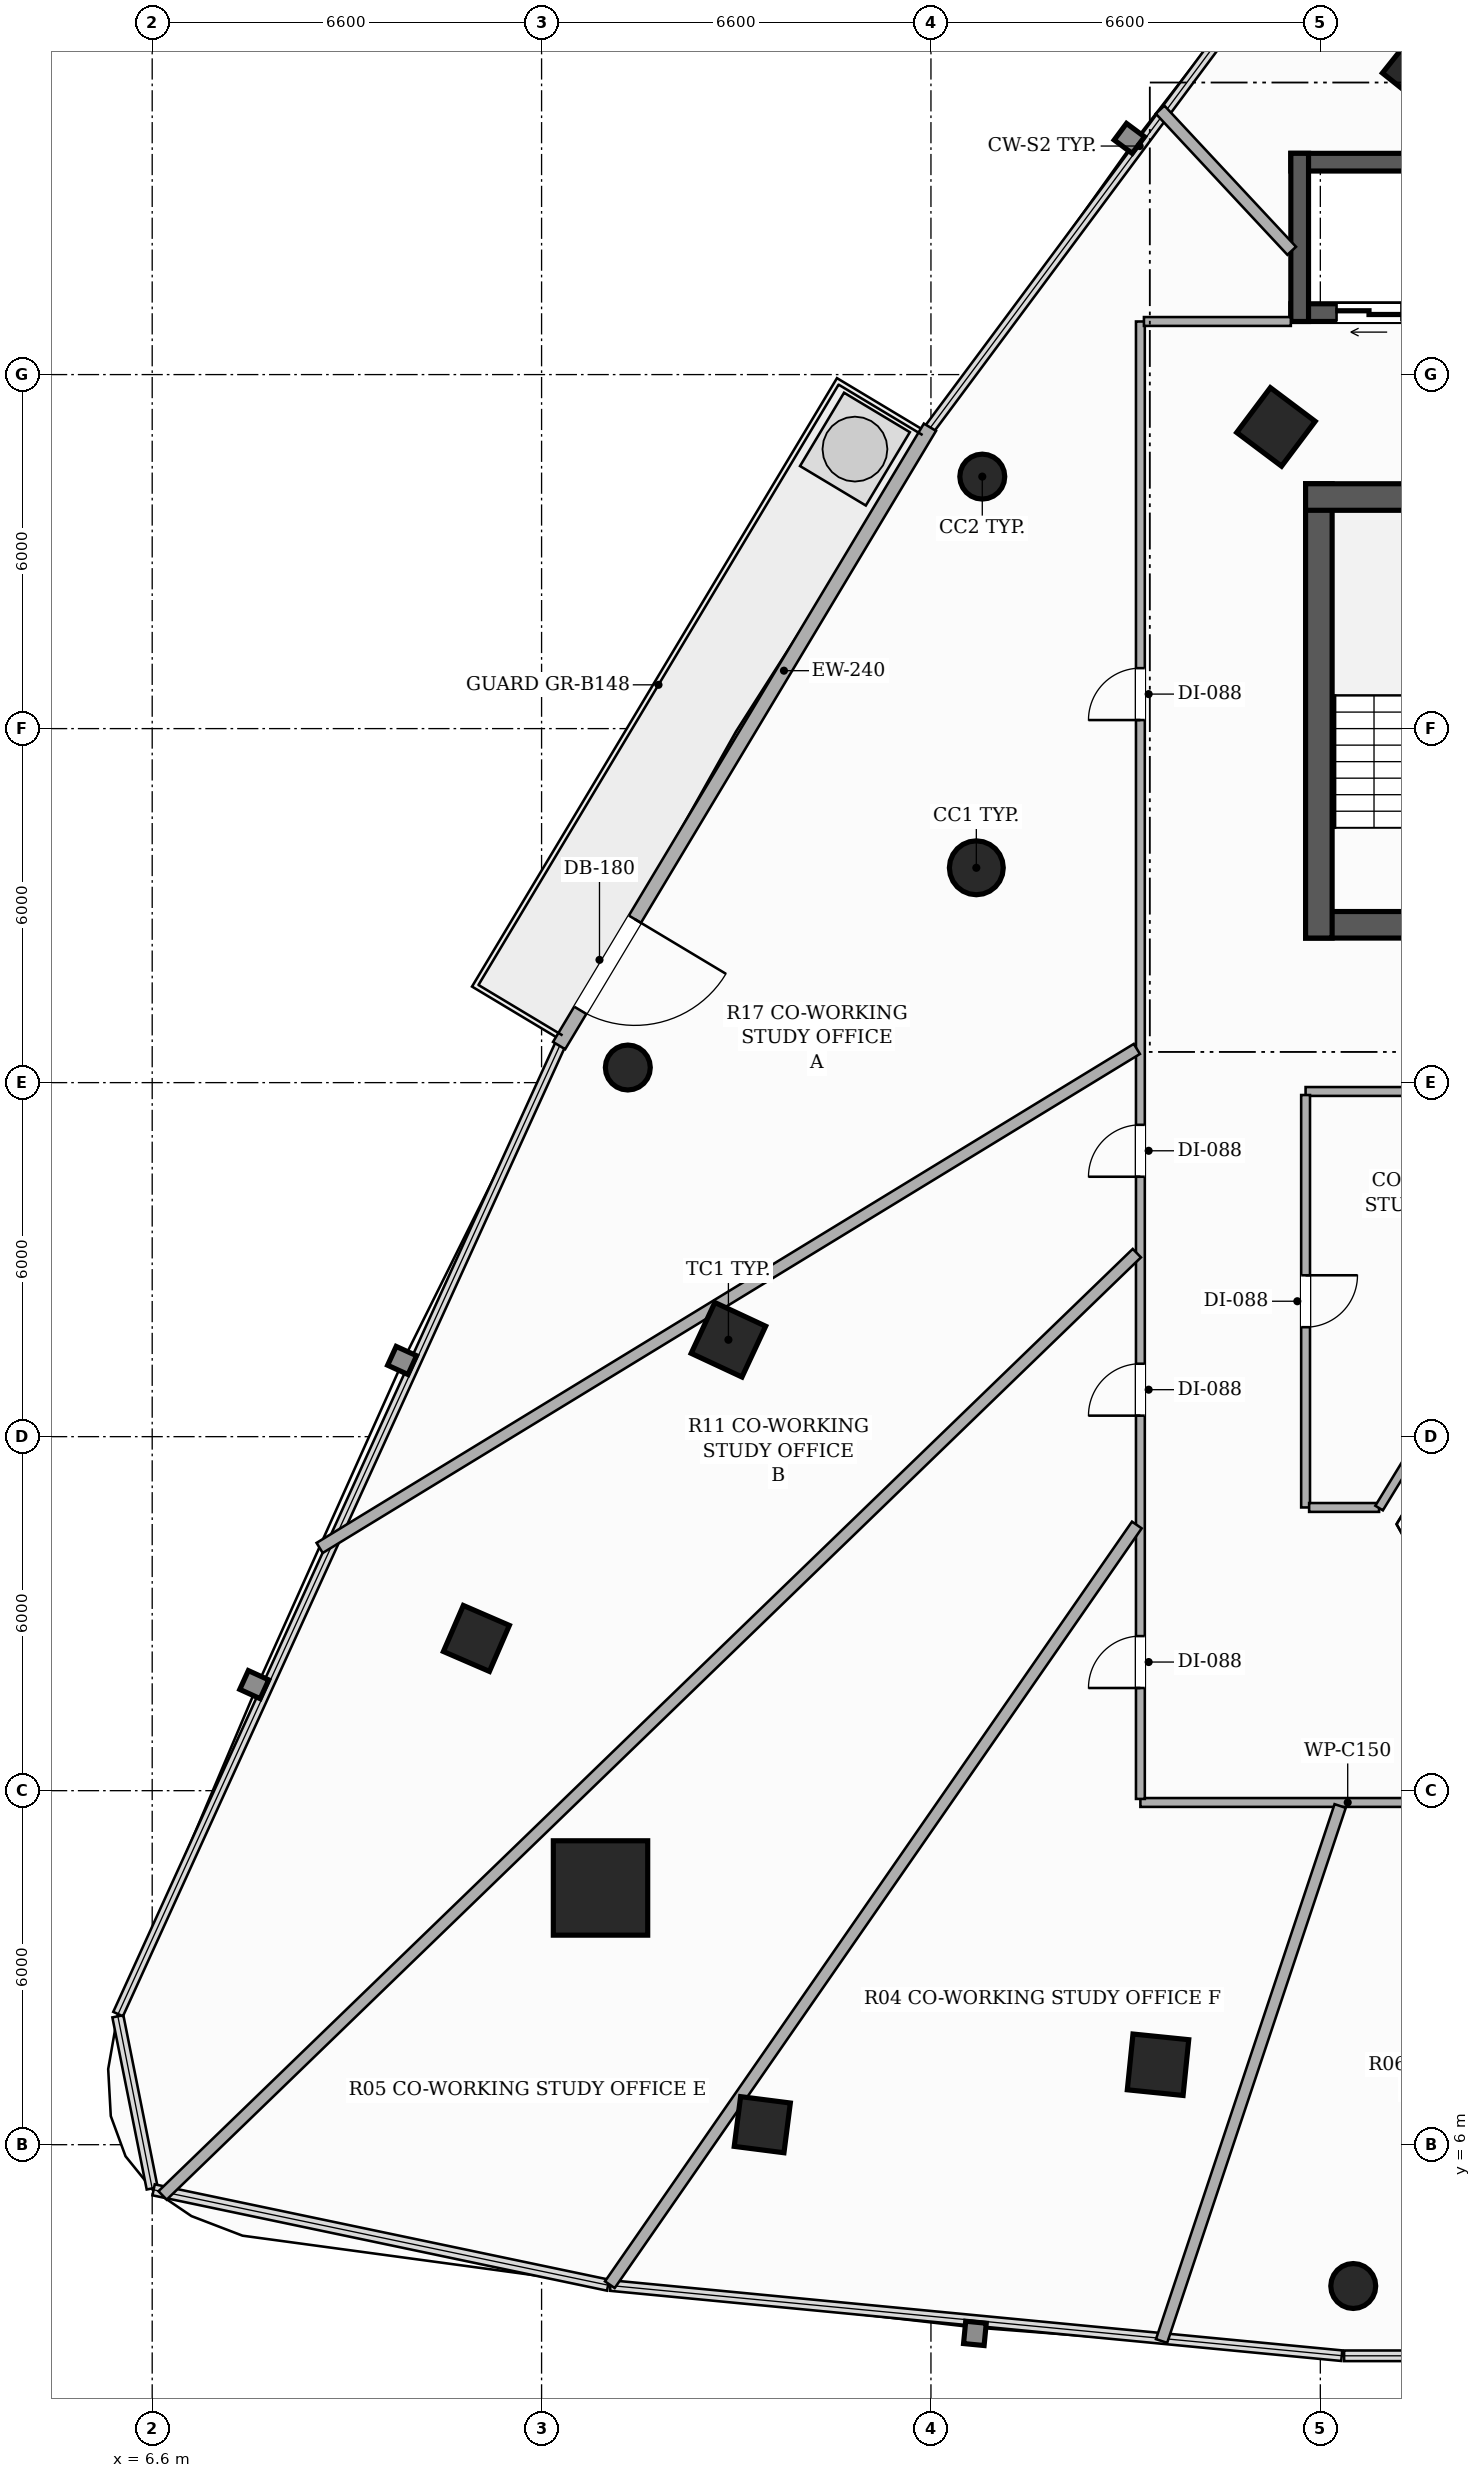
"""IFC4 building model, lengths in metres.
Left out: names, types, materials, properties, quantities, classifications, styles, units other than length and angle.
Written with IfcOpenShell. Run it as: python <this file> out.ifc"""

import sys

from ifc_helpers import new_model, si_unit, direction, frame, frame_2d, origin, origin_2d, place, context, subcontext, project, spatial, rectangle, hollow_rectangle, hollow_circle, extrude, element, fill, save


model = new_model("IFC4")
c1 = context("Model", 3, precision=1e-05, world=origin(), true_north=direction((0.0, 1.0)))
c2 = subcontext(c1, "Body", "Model", "MODEL_VIEW")
j1 = project(units=[si_unit("LENGTHUNIT", "METRE"), si_unit("PLANEANGLEUNIT", "RADIAN")], contexts=[c1])
p1 = place(None, origin())
s1 = spatial("IfcSite", under=j1, at=p1, CompositionType="ELEMENT")
p2 = place(p1, origin())
s2 = spatial("IfcBuilding", under=s1, at=p2, CompositionType="ELEMENT")
p3 = place(p2, frame((0.0, 0.0, 93.95)))
s3 = spatial("IfcBuildingStorey", under=s2, at=p3, CompositionType="ELEMENT", Elevation=93.95)
p4 = place(p3, frame((26.15, 26.675, 0.0), z_axis=(0.0, 0.0, 1.0), x_axis=(1.0, 0.0, 0.0)))
e1 = element("IfcWall", 1, at=p4, inside=s3, PredefinedType="SHEAR", context=c2, shape_type="SweptSolid", body=[
    extrude(rectangle(XDim=13.7, YDim=0.45, at=frame_2d((6.85, 0.0))), origin(), (0.0, 0.0, 1.0), 3.3),
])
p5 = place(p4, frame((4.35, 0.0, 0.0)))
e2 = element("IfcOpeningElement", 2, at=p5, cuts=e1, PredefinedType="OPENING", context=c2, shape_type="SweptSolid", body=[
    extrude(rectangle(XDim=1.05, YDim=2.15, at=frame_2d((0.525, 1.075))), frame((0.0, 0.235, 0.0), z_axis=(0.0, -1.0, 0.0), x_axis=(1.0, 0.0, 0.0)), (0.0, 0.0, 1.0), 0.47),
])
p6 = place(p4, frame((8.3, 0.0, 0.0)))
e3 = element("IfcOpeningElement", 3, at=p6, cuts=e1, PredefinedType="OPENING", context=c2, shape_type="SweptSolid", body=[
    extrude(rectangle(XDim=1.05, YDim=2.15, at=frame_2d((0.525, 1.075))), frame((0.0, 0.235, 0.0), z_axis=(0.0, -1.0, 0.0), x_axis=(1.0, 0.0, 0.0)), (0.0, 0.0, 1.0), 0.47),
])
p7 = place(p3, frame((26.375, 26.45, 0.0), z_axis=(0.0, 0.0, 1.0), x_axis=(0.0, 1.0, 0.0)))
e4 = element("IfcWall", 4, at=p7, inside=s3, PredefinedType="SHEAR", context=c2, shape_type="SweptSolid", body=[
    extrude(rectangle(XDim=7.7, YDim=0.45, at=frame_2d((3.85, 0.0))), origin(), (0.0, 0.0, 1.0), 3.3),
])
p8 = place(p3, frame((26.15, 33.925, 0.0), z_axis=(0.0, 0.0, 1.0), x_axis=(1.0, 0.0, 0.0)))
e5 = element("IfcWall", 5, at=p8, inside=s3, PredefinedType="SHEAR", context=c2, shape_type="SweptSolid", body=[
    extrude(rectangle(XDim=3.75, YDim=0.45, at=frame_2d((1.875, 0.0))), origin(), (0.0, 0.0, 1.0), 3.3),
])
p9 = place(p3, frame((40.1, 37.05, 0.0), z_axis=(0.0, 0.0, 1.0), x_axis=(-1.0, 0.0, 0.0)))
e6 = element("IfcWall", 6, at=p9, inside=s3, PredefinedType="SHEAR", context=c2, shape_type="SweptSolid", body=[
    extrude(rectangle(XDim=14.2, YDim=0.3, at=frame_2d((7.1, 0.0))), origin(), (0.0, 0.0, 1.0), 3.3),
])
p10 = place(p9, frame((12.325, 0.0, 0.0)))
e7 = element("IfcOpeningElement", 7, at=p10, cuts=e6, PredefinedType="OPENING", context=c2, shape_type="SweptSolid", body=[
    extrude(rectangle(XDim=1.1, YDim=2.2, at=frame_2d((0.55, 1.1))), frame((0.0, 0.16, 0.0), z_axis=(0.0, -1.0, 0.0), x_axis=(1.0, 0.0, 0.0)), (0.0, 0.0, 1.0), 0.32),
])
p11 = place(p9, frame((0.775, 0.0, 0.0)))
e8 = element("IfcOpeningElement", 8, at=p11, cuts=e6, PredefinedType="OPENING", context=c2, shape_type="SweptSolid", body=[
    extrude(rectangle(XDim=1.1, YDim=2.2, at=frame_2d((0.55, 1.1))), frame((0.0, 0.16, 0.0), z_axis=(0.0, -1.0, 0.0), x_axis=(1.0, 0.0, 0.0)), (0.0, 0.0, 1.0), 0.32),
])
p12 = place(p3, frame((25.9, 39.6, 0.0), z_axis=(0.0, 0.0, 1.0), x_axis=(1.0, 0.0, 0.0)))
e9 = element("IfcWall", 9, at=p12, inside=s3, PredefinedType="SHEAR", context=c2, shape_type="SweptSolid", body=[
    extrude(rectangle(XDim=14.2, YDim=0.3, at=frame_2d((7.1, 0.0))), origin(), (0.0, 0.0, 1.0), 3.3),
])
p13 = place(p3, frame((26.05, 36.9, 0.0), z_axis=(0.0, 0.0, 1.0), x_axis=(0.0, 1.0, 0.0)))
e10 = element("IfcWall", 10, at=p13, inside=s3, PredefinedType="SHEAR", context=c2, shape_type="SweptSolid", body=[
    extrude(rectangle(XDim=2.85, YDim=0.3, at=frame_2d((1.425, 0.0))), origin(), (0.0, 0.0, 1.0), 3.3),
])
p14 = place(p3, frame((14.199, 10.351, 0.0), z_axis=(0.0, 0.0, 1.0), x_axis=(1.0, 0.0, 0.0)))
e11 = element("IfcColumn", 11, at=p14, inside=s3, PredefinedType="COLUMN", context=c2, shape_type="SweptSolid", body=[
    extrude(hollow_rectangle(XDim=1.6, YDim=1.6, WallThickness=0.05, at=origin_2d()), origin(), (0.0, 0.0, 1.0), 3.3),
])
p15 = place(p3, frame((25.648, 35.113, 0.0), z_axis=(0.0, 0.0, 1.0), x_axis=(0.600420225326, 0.799684658487, 0.0)))
e12 = element("IfcColumn", 12, at=p15, inside=s3, PredefinedType="COLUMN", context=c2, shape_type="SweptSolid", body=[
    extrude(hollow_rectangle(XDim=0.95, YDim=0.95, WallThickness=0.032, at=origin_2d()), origin(), (0.0, 0.0, 1.0), 3.3),
])
p16 = place(p3, frame((20.569, 27.641, 0.0), z_axis=(0.0, 0.0, 1.0), x_axis=(1.0, 0.0, 0.0)))
e13 = element("IfcColumn", 13, at=p16, inside=s3, PredefinedType="COLUMN", context=c2, shape_type="SweptSolid", body=[
    extrude(hollow_circle(Radius=0.457, WallThickness=0.025, at=origin_2d()), origin(), (0.0, 0.0, 1.0), 3.3),
])
for number, where, z_axis, x_axis in (
    (14, (16.367, 19.642, 0.0), (0.0, 0.0, 1.0), (0.423, 0.906, 0.0)),
    (15, (23.649, 7.355, 0.0), (0.0, 0.0, 1.0), (-0.995, 0.101, 0.0)),
):
    element("IfcColumn", number, at=place(p3, frame(where, z_axis=z_axis, x_axis=x_axis)), inside=s3, PredefinedType="COLUMN", context=c2, shape_type="SweptSolid", body=[
        extrude(hollow_rectangle(XDim=0.95, YDim=0.95, WallThickness=0.032, at=origin_2d()), origin(), (0.0, 0.0, 1.0), 3.3),
    ])
for number, where, z_axis, x_axis in (
    (16, (28.05, 41.178, 0.0), (0.0, 0.0, 1.0), (0.624, 0.782, 0.0)),
    (17, (12.095, 14.58, 0.0), (0.0, 0.0, 1.0), (0.397, 0.918, 0.0)),
    (18, (16.941, 6.339, 0.0), (0.0, 0.0, 1.0), (-0.992, 0.127, 0.0)),
):
    element("IfcColumn", number, at=place(p3, frame(where, z_axis=z_axis, x_axis=x_axis)), inside=s3, PredefinedType="COLUMN", context=c2, shape_type="SweptSolid", body=[
        extrude(hollow_rectangle(XDim=0.85, YDim=0.85, WallThickness=0.028, at=origin_2d()), origin(), (0.0, 0.0, 1.0), 3.3),
    ])
for number, where, z_axis, x_axis in (
    (19, (20.67, 34.271, 0.0), (0.0, 0.0, 1.0), (1.0, 0.0, 0.0)),
    (20, (14.662, 24.256, 0.0), (0.0, 0.0, 1.0), (1.0, 0.0, 0.0)),
    (21, (26.958, 3.605, 0.0), (0.0, 0.0, 1.0), (1.0, 0.0, 0.0)),
):
    element("IfcColumn", number, at=place(p3, frame(where, z_axis=z_axis, x_axis=x_axis)), inside=s3, PredefinedType="COLUMN", context=c2, shape_type="SweptSolid", body=[
        extrude(hollow_circle(Radius=0.381, WallThickness=0.022, at=origin_2d()), origin(), (0.0, 0.0, 1.0), 3.3),
    ])
p17 = place(p3, frame((19.783, 35.108, 0.0), z_axis=(0.0, 0.0, 1.0), x_axis=(-0.514369419392, -0.857568714678, 0.0)))
e22 = element("IfcWall", 22, at=p17, inside=s3, PredefinedType="SOLIDWALL", context=c2, shape_type="SweptSolid", body=[
    extrude(rectangle(XDim=12.22, YDim=0.24, at=frame_2d((6.11, 0.0))), origin(), (0.0, 0.0, 1.0), 2.584),
])
p18 = place(p17, frame((9.723, 0.0, 0.0)))
e23 = element("IfcOpeningElement", 23, at=p18, cuts=e22, PredefinedType="OPENING", context=c2, shape_type="SweptSolid", body=[
    extrude(rectangle(XDim=1.8, YDim=2.2, at=frame_2d((0.9, 1.1))), frame((0.0, 0.13, 0.0), z_axis=(0.0, -1.0, 0.0), x_axis=(1.0, 0.0, 0.0)), (0.0, 0.0, 1.0), 0.26),
])
p19 = place(p3, frame((42.59, 11.8, 0.0), z_axis=(0.0, 0.0, 1.0), x_axis=(-1.0, 0.0, 0.0)))
e24 = element("IfcWall", 24, at=p19, inside=s3, PredefinedType="PARTITIONING", context=c2, shape_type="SweptSolid", body=[
    extrude(rectangle(XDim=19.24, YDim=0.15, at=frame_2d((9.62, 0.0))), origin(), (0.0, 0.0, 1.0), 2.629),
])
p20 = place(p19, frame((11.192, 0.0, 0.0)))
e25 = element("IfcOpeningElement", 25, at=p20, cuts=e24, PredefinedType="OPENING", context=c2, shape_type="SweptSolid", body=[
    extrude(rectangle(XDim=0.92, YDim=2.15, at=frame_2d((0.46, 1.075))), frame((0.0, 0.085, 0.0), z_axis=(0.0, -1.0, 0.0), x_axis=(1.0, 0.0, 0.0)), (0.0, 0.0, 1.0), 0.17),
])
p21 = place(p19, frame((3.42, 0.0, 0.0)))
e26 = element("IfcOpeningElement", 26, at=p21, cuts=e24, PredefinedType="OPENING", context=c2, shape_type="SweptSolid", body=[
    extrude(rectangle(XDim=0.92, YDim=2.15, at=frame_2d((0.46, 1.075))), frame((0.0, 0.085, 0.0), z_axis=(0.0, -1.0, 0.0), x_axis=(1.0, 0.0, 0.0)), (0.0, 0.0, 1.0), 0.17),
])
p22 = place(p3, frame((23.35, 11.86, 0.0), z_axis=(0.0, 0.0, 1.0), x_axis=(0.0, 1.0, 0.0)))
e27 = element("IfcWall", 27, at=p22, inside=s3, PredefinedType="PARTITIONING", context=c2, shape_type="SweptSolid", body=[
    extrude(rectangle(XDim=25.04, YDim=0.15, at=frame_2d((12.52, 0.0))), origin(), (0.0, 0.0, 1.0), 2.373),
])
p23 = place(p22, frame((18.285, 0.0, 0.0)))
e28 = element("IfcOpeningElement", 28, at=p23, cuts=e27, PredefinedType="OPENING", context=c2, shape_type="SweptSolid", body=[
    extrude(rectangle(XDim=0.88, YDim=2.1, at=frame_2d((0.44, 1.05))), frame((0.0, 0.085, 0.0), z_axis=(0.0, -1.0, 0.0), x_axis=(1.0, 0.0, 0.0)), (0.0, 0.0, 1.0), 0.17),
])
p24 = place(p22, frame((10.545, 0.0, 0.0)))
e29 = element("IfcOpeningElement", 29, at=p24, cuts=e27, PredefinedType="OPENING", context=c2, shape_type="SweptSolid", body=[
    extrude(rectangle(XDim=0.88, YDim=2.1, at=frame_2d((0.44, 1.05))), frame((0.0, 0.085, 0.0), z_axis=(0.0, -1.0, 0.0), x_axis=(1.0, 0.0, 0.0)), (0.0, 0.0, 1.0), 0.17),
])
p25 = place(p22, frame((6.496, 0.0, 0.0)))
e30 = element("IfcOpeningElement", 30, at=p25, cuts=e27, PredefinedType="OPENING", context=c2, shape_type="SweptSolid", body=[
    extrude(rectangle(XDim=0.88, YDim=2.1, at=frame_2d((0.44, 1.05))), frame((0.0, 0.085, 0.0), z_axis=(0.0, -1.0, 0.0), x_axis=(1.0, 0.0, 0.0)), (0.0, 0.0, 1.0), 0.17),
])
p26 = place(p22, frame((1.88, 0.0, 0.0)))
e31 = element("IfcOpeningElement", 31, at=p26, cuts=e27, PredefinedType="OPENING", context=c2, shape_type="SweptSolid", body=[
    extrude(rectangle(XDim=0.88, YDim=2.1, at=frame_2d((0.44, 1.05))), frame((0.0, 0.085, 0.0), z_axis=(0.0, -1.0, 0.0), x_axis=(1.0, 0.0, 0.0)), (0.0, 0.0, 1.0), 0.17),
])
p27 = place(p3, frame((23.41, 36.9, 0.0), z_axis=(0.0, 0.0, 1.0), x_axis=(1.0, 0.0, 0.0)))
e32 = element("IfcWall", 32, at=p27, inside=s3, PredefinedType="PARTITIONING", context=c2, shape_type="SweptSolid", body=[
    extrude(rectangle(XDim=2.49, YDim=0.15, at=frame_2d((1.245, 0.0))), origin(), (0.0, 0.0, 1.0), 2.373),
])
p28 = place(p3, frame((31.706, 23.85, 0.0), z_axis=(0.0, 0.0, 1.0), x_axis=(-1.0, 0.0, 0.0)))
e33 = element("IfcWall", 33, at=p28, inside=s3, PredefinedType="PARTITIONING", context=c2, shape_type="SweptSolid", body=[
    extrude(rectangle(XDim=5.556, YDim=0.15, at=frame_2d((2.778, 0.0))), origin(), (0.0, 0.0, 1.0), 2.629),
])
p29 = place(p3, frame((26.15, 23.79, 0.0), z_axis=(0.0, 0.0, 1.0), x_axis=(0.0, -1.0, 0.0)))
e34 = element("IfcWall", 34, at=p29, inside=s3, PredefinedType="PARTITIONING", context=c2, shape_type="SweptSolid", body=[
    extrude(rectangle(XDim=6.99, YDim=0.15, at=frame_2d((3.495, 0.0))), origin(), (0.0, 0.0, 1.0), 2.629),
])
p30 = place(p29, frame((3.055, 0.0, 0.0)))
e35 = element("IfcOpeningElement", 35, at=p30, cuts=e34, PredefinedType="OPENING", context=c2, shape_type="SweptSolid", body=[
    extrude(rectangle(XDim=0.88, YDim=2.1, at=frame_2d((0.44, 1.05))), frame((0.0, 0.085, 0.0), z_axis=(0.0, -1.0, 0.0), x_axis=(1.0, 0.0, 0.0)), (0.0, 0.0, 1.0), 0.17),
])
p31 = place(p3, frame((26.21, 16.8, 0.0), z_axis=(0.0, 0.0, 1.0), x_axis=(1.0, 0.0, 0.0)))
e36 = element("IfcWall", 36, at=p31, inside=s3, PredefinedType="PARTITIONING", context=c2, shape_type="SweptSolid", body=[
    extrude(rectangle(XDim=1.186, YDim=0.15, at=frame_2d((0.593, 0.0))), origin(), (0.0, 0.0, 1.0), 3.02),
])
p32 = place(p3, frame((27.396, 16.79, 0.0), z_axis=(0.0, 0.0, 1.0), x_axis=(0.521563150989, 0.8532126813, 0.0)))
e37 = element("IfcWall", 37, at=p32, inside=s3, PredefinedType="PARTITIONING", context=c2, shape_type="SweptSolid", body=[
    extrude(rectangle(XDim=8.204, YDim=0.15, at=frame_2d((4.102, 0.0))), origin(), (0.0, 0.0, 1.0), 2.629),
])
p33 = place(p3, frame((25.915, 38.098, 0.0), z_axis=(0.0, 0.0, 1.0), x_axis=(-0.682046951702, 0.731308386165, 0.0)))
e38 = element("IfcWall", 38, at=p33, inside=s3, PredefinedType="PARTITIONING", context=c2, shape_type="SweptSolid", body=[
    extrude(rectangle(XDim=3.271, YDim=0.2, at=frame_2d((1.635, 0.0))), origin(), (0.0, 0.0, 1.0), 3.02),
])
p34 = place(p3, frame((23.29, 24.571, 0.0), z_axis=(0.0, 0.0, 1.0), x_axis=(-0.85350412057, -0.521086092858, 0.0)))
e39 = element("IfcWall", 39, at=p34, inside=s3, PredefinedType="PARTITIONING", context=c2, shape_type="SweptSolid", body=[
    extrude(rectangle(XDim=16.23, YDim=0.2, at=frame_2d((8.115, 0.0))), origin(), (0.0, 0.0, 1.0), 2.373),
])
p35 = place(p3, frame((23.29, 21.11, 0.0), z_axis=(0.0, 0.0, 1.0), x_axis=(-0.718846392138, -0.695168946739, 0.0)))
e40 = element("IfcWall", 40, at=p35, inside=s3, PredefinedType="PARTITIONING", context=c2, shape_type="SweptSolid", body=[
    extrude(rectangle(XDim=22.973, YDim=0.2, at=frame_2d((11.487, 0.0))), origin(), (0.0, 0.0, 1.0), 2.373),
])
p36 = place(p3, frame((23.709, 2.673, 0.0), z_axis=(0.0, 0.0, 1.0), x_axis=(0.316679801448, 0.948532499894, 0.0)))
e41 = element("IfcWall", 41, at=p36, inside=s3, PredefinedType="PARTITIONING", context=c2, shape_type="SweptSolid", body=[
    extrude(rectangle(XDim=9.559, YDim=0.2, at=frame_2d((4.779, 0.0))), origin(), (0.0, 0.0, 1.0), 2.373),
])
p37 = place(p3, frame((23.29, 16.503, 0.0), z_axis=(0.0, 0.0, 1.0), x_axis=(-0.57002789499, -0.821625339759, 0.0)))
e42 = element("IfcWall", 42, at=p37, inside=s3, PredefinedType="PARTITIONING", context=c2, shape_type="SweptSolid", body=[
    extrude(rectangle(XDim=15.671, YDim=0.2, at=frame_2d((7.836, 0.0))), origin(), (0.0, 0.0, 1.0), 2.373),
])
p38 = place(p18, origin())
e43 = element("IfcDoor", 43, at=p38, inside=s3, OperationType="SINGLE_SWING_LEFT", PredefinedType="DOOR", context=c2, shape_type="SweptSolid", body=[
    extrude(rectangle(XDim=1.8, YDim=2.2, at=frame_2d((0.9, 1.1))), frame((0.0, 0.025, 0.0), z_axis=(0.0, -1.0, 0.0), x_axis=(1.0, 0.0, 0.0)), (0.0, 0.0, 1.0), 0.05),
])
fill(e23, e43)
p39 = place(p10, origin())
e44 = element("IfcDoor", 44, at=p39, inside=s3, OperationType="DOUBLE_DOOR_SLIDING", PredefinedType="DOOR", context=c2, shape_type="SweptSolid", body=[
    extrude(rectangle(XDim=1.1, YDim=2.2, at=frame_2d((0.55, 1.1))), frame((0.0, 0.025, 0.0), z_axis=(0.0, -1.0, 0.0), x_axis=(1.0, 0.0, 0.0)), (0.0, 0.0, 1.0), 0.05),
])
fill(e7, e44)
p40 = place(p23, origin())
e45 = element("IfcDoor", 45, at=p40, inside=s3, OperationType="SINGLE_SWING_LEFT", PredefinedType="DOOR", context=c2, shape_type="SweptSolid", body=[
    extrude(rectangle(XDim=0.88, YDim=2.1, at=frame_2d((0.44, 1.05))), frame((0.0, 0.025, 0.0), z_axis=(0.0, -1.0, 0.0), x_axis=(1.0, 0.0, 0.0)), (0.0, 0.0, 1.0), 0.05),
])
fill(e28, e45)
p41 = place(p24, origin())
e46 = element("IfcDoor", 46, at=p41, inside=s3, OperationType="SINGLE_SWING_LEFT", PredefinedType="DOOR", context=c2, shape_type="SweptSolid", body=[
    extrude(rectangle(XDim=0.88, YDim=2.1, at=frame_2d((0.44, 1.05))), frame((0.0, 0.025, 0.0), z_axis=(0.0, -1.0, 0.0), x_axis=(1.0, 0.0, 0.0)), (0.0, 0.0, 1.0), 0.05),
])
fill(e29, e46)
p42 = place(p25, origin())
e47 = element("IfcDoor", 47, at=p42, inside=s3, OperationType="SINGLE_SWING_LEFT", PredefinedType="DOOR", context=c2, shape_type="SweptSolid", body=[
    extrude(rectangle(XDim=0.88, YDim=2.1, at=frame_2d((0.44, 1.05))), frame((0.0, 0.025, 0.0), z_axis=(0.0, -1.0, 0.0), x_axis=(1.0, 0.0, 0.0)), (0.0, 0.0, 1.0), 0.05),
])
fill(e30, e47)
p43 = place(p26, origin())
e48 = element("IfcDoor", 48, at=p43, inside=s3, OperationType="SINGLE_SWING_LEFT", PredefinedType="DOOR", context=c2, shape_type="SweptSolid", body=[
    extrude(rectangle(XDim=0.88, YDim=2.1, at=frame_2d((0.44, 1.05))), frame((0.0, 0.025, 0.0), z_axis=(0.0, -1.0, 0.0), x_axis=(1.0, 0.0, 0.0)), (0.0, 0.0, 1.0), 0.05),
])
fill(e31, e48)
p44 = place(p30, origin())
e49 = element("IfcDoor", 49, at=p44, inside=s3, OperationType="SINGLE_SWING_LEFT", PredefinedType="DOOR", context=c2, shape_type="SweptSolid", body=[
    extrude(rectangle(XDim=0.88, YDim=2.1, at=frame_2d((0.44, 1.05))), frame((0.0, 0.025, 0.0), z_axis=(0.0, -1.0, 0.0), x_axis=(1.0, 0.0, 0.0)), (0.0, 0.0, 1.0), 0.05),
])
fill(e35, e49)
save(model, sys.argv[1])
